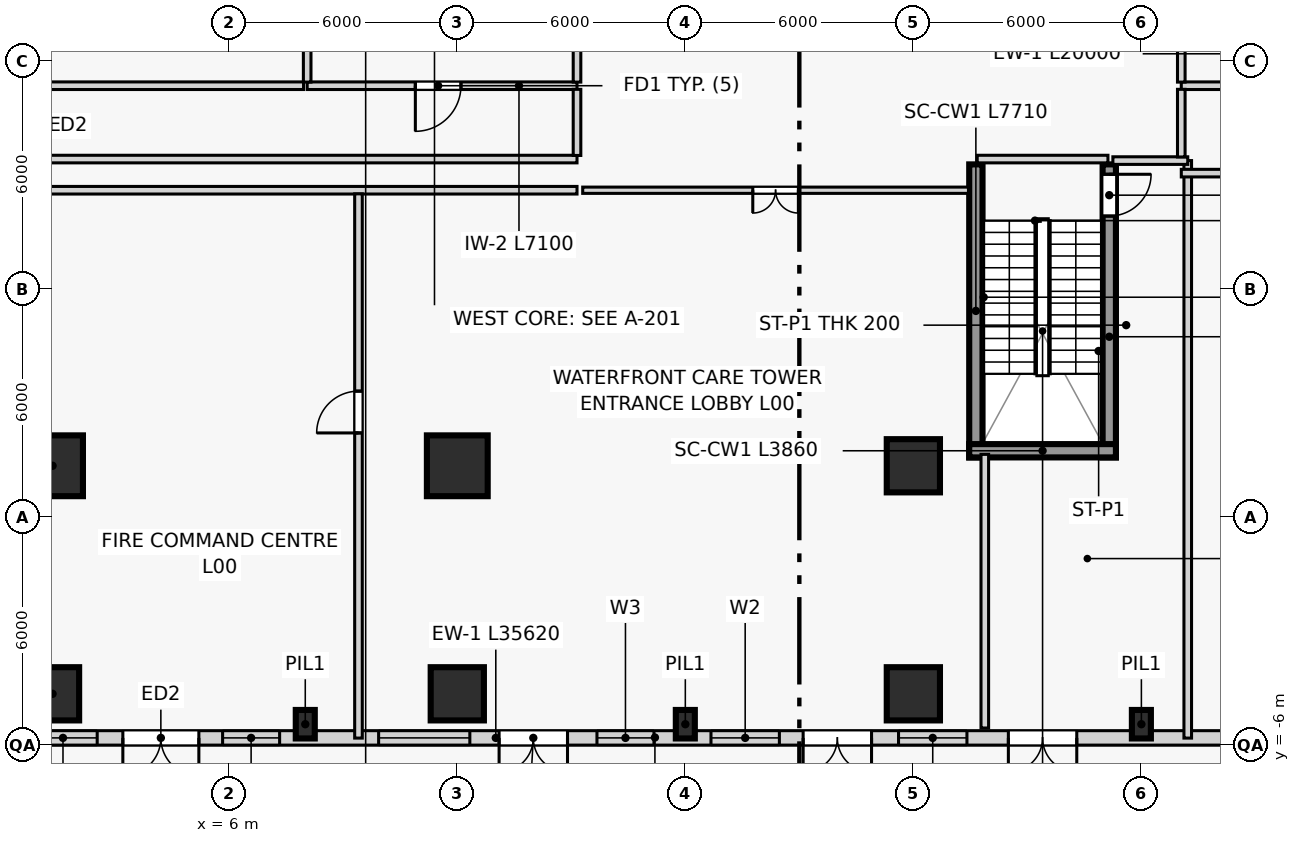
"""IFC4 building model, lengths in metres.
Left out: names, types, materials, properties, quantities, classifications, styles, units other than length and angle.
Written with IfcOpenShell. Run it as: python <this file> out.ifc"""

import sys

from ifc_helpers import new_model, si_unit, direction, frame, frame_2d, origin, origin_2d, place, context, subcontext, project, spatial, rectangle, extrude, source, transform, mapped, element, fill, save


model = new_model("IFC4")
c1 = context("Model", 3, precision=1e-05, world=origin(), true_north=direction((0.0, 1.0)))
c2 = subcontext(c1, "Body", "Model", "MODEL_VIEW")
j1 = project(units=[si_unit("LENGTHUNIT", "METRE"), si_unit("PLANEANGLEUNIT", "RADIAN")], contexts=[c1])
p1 = place(None, origin())
s1 = spatial("IfcSite", under=j1, at=p1, CompositionType="ELEMENT")
p2 = place(p1, origin())
s2 = spatial("IfcBuilding", under=s1, at=p2, CompositionType="ELEMENT")
p3 = place(p2, origin())
s3 = spatial("IfcBuildingStorey", under=s2, at=p3, CompositionType="ELEMENT", Elevation=0.0)
p4 = place(p3, frame((25.645, 1.57, 0.0), z_axis=(0.0, 0.0, 1.0), x_axis=(0.0, 1.0, 0.0)))
e1 = element("IfcWall", 1, at=p4, inside=s3, PredefinedType="SHEAR", context=c2, shape_type="SweptSolid", body=[
    extrude(rectangle(XDim=7.71, YDim=0.35, at=frame_2d((3.855, 0.0))), origin(), (0.0, 0.0, 1.0), 4.5),
])
p5 = place(p3, frame((29.155, 1.57, 0.0), z_axis=(0.0, 0.0, 1.0), x_axis=(0.0, 1.0, 0.0)))
e2 = element("IfcWall", 2, at=p5, inside=s3, PredefinedType="SHEAR", context=c2, shape_type="SweptSolid", body=[
    extrude(rectangle(XDim=7.71, YDim=0.35, at=frame_2d((3.855, 0.0))), origin(), (0.0, 0.0, 1.0), 4.5),
])
p6 = place(p5, frame((6.35, 0.0, 0.0)))
e3 = element("IfcOpeningElement", 3, at=p6, cuts=e2, PredefinedType="OPENING", context=c2, shape_type="SweptSolid", body=[
    extrude(rectangle(XDim=1.1, YDim=2.2, at=frame_2d((0.55, 1.1))), frame((0.0, 0.185, 0.0), z_axis=(0.0, -1.0, 0.0), x_axis=(1.0, 0.0, 0.0)), (0.0, 0.0, 1.0), 0.37),
])
p7 = place(p3, frame((25.47, 1.745, 0.0), z_axis=(0.0, 0.0, 1.0), x_axis=(1.0, 0.0, 0.0)))
e4 = element("IfcWall", 4, at=p7, inside=s3, PredefinedType="SHEAR", context=c2, shape_type="SweptSolid", body=[
    extrude(rectangle(XDim=3.86, YDim=0.35, at=frame_2d((1.93, 0.0))), origin(), (0.0, 0.0, 1.0), 4.5),
])
m1 = source(origin(), c2, "Body", "SweptSolid", [
    extrude(rectangle(XDim=1.4, YDim=1.4, at=origin_2d()), origin(), (0.0, 0.0, 1.0), 4.5),
])
p8 = place(p3, frame((1.35, -4.65, 0.0), z_axis=(0.0, 0.0, 1.0), x_axis=(1.0, 0.0, 0.0)))
e5 = element("IfcColumn", 5, at=p8, inside=s3, PredefinedType="COLUMN", context=c2, shape_type="MappedRepresentation", body=[
    mapped(m1, transform((0.0, 0.0, 0.0), scale=1.0)),
])
m2 = source(origin(), c2, "Body", "SweptSolid", [
    extrude(rectangle(XDim=1.6, YDim=1.6, at=origin_2d()), origin(), (0.0, 0.0, 1.0), 4.5),
])
p9 = place(p3, frame((1.35, 1.35, 0.0), z_axis=(0.0, 0.0, 1.0), x_axis=(1.0, 0.0, 0.0)))
e6 = element("IfcColumn", 6, at=p9, inside=s3, PredefinedType="COLUMN", context=c2, shape_type="MappedRepresentation", body=[
    mapped(m2, transform((0.0, 0.0, 0.0), scale=1.0)),
])
p10 = place(p3, frame((12.0, -4.65, 0.0), z_axis=(0.0, 0.0, 1.0), x_axis=(1.0, 0.0, 0.0)))
e7 = element("IfcColumn", 7, at=p10, inside=s3, PredefinedType="COLUMN", context=c2, shape_type="MappedRepresentation", body=[
    mapped(m1, transform((0.0, 0.0, 0.0), scale=1.0)),
])
p11 = place(p3, frame((12.0, 1.35, 0.0), z_axis=(0.0, 0.0, 1.0), x_axis=(1.0, 0.0, 0.0)))
e8 = element("IfcColumn", 8, at=p11, inside=s3, PredefinedType="COLUMN", context=c2, shape_type="MappedRepresentation", body=[
    mapped(m2, transform((0.0, 0.0, 0.0), scale=1.0)),
])
for number, where, z_axis, x_axis in (
    (9, (24.0, -4.65, 0.0), (0.0, 0.0, 1.0), (1.0, 0.0, 0.0)),
    (10, (24.0, 1.35, 0.0), (0.0, 0.0, 1.0), (1.0, 0.0, 0.0)),
):
    element("IfcColumn", number, at=place(p3, frame(where, z_axis=z_axis, x_axis=x_axis)), inside=s3, PredefinedType="COLUMN", context=c2, shape_type="MappedRepresentation", body=[
        mapped(m1, transform((0.0, 0.0, 0.0), scale=1.0)),
    ])
m3 = source(origin(), c2, "Body", "SweptSolid", [
    extrude(rectangle(XDim=0.5, YDim=0.75, at=origin_2d()), origin(), (0.0, 0.0, 1.0), 4.5),
])
for number, where, z_axis, x_axis in (
    (11, (8.0, -5.45, 0.0), (0.0, 0.0, 1.0), (1.0, 0.0, 0.0)),
    (12, (18.0, -5.45, 0.0), (0.0, 0.0, 1.0), (1.0, 0.0, 0.0)),
    (13, (30.0, -5.45, 0.0), (0.0, 0.0, 1.0), (1.0, 0.0, 0.0)),
):
    element("IfcColumn", number, at=place(p3, frame(where, z_axis=z_axis, x_axis=x_axis)), inside=s3, PredefinedType="PILASTER", context=c2, shape_type="MappedRepresentation", body=[
        mapped(m3, transform((0.0, 0.0, 0.0), scale=1.0)),
    ])
p12 = place(p3, frame((0.19, -5.81, 0.0), z_axis=(0.0, 0.0, 1.0), x_axis=(1.0, 0.0, 0.0)))
e14 = element("IfcWall", 14, at=p12, inside=s3, PredefinedType="SOLIDWALL", context=c2, shape_type="SweptSolid", body=[
    extrude(rectangle(XDim=35.62, YDim=0.38, at=frame_2d((17.81, 0.0))), origin(), (0.0, 0.0, 1.0), 4.16),
])
p13 = place(p12, frame((0.535, 0.0, 0.8)))
e15 = element("IfcOpeningElement", 15, at=p13, cuts=e14, PredefinedType="OPENING", context=c2, shape_type="SweptSolid", body=[
    extrude(rectangle(XDim=1.8, YDim=2.1, at=frame_2d((0.9, 1.05))), frame((0.0, 0.2, 0.0), z_axis=(0.0, -1.0, 0.0), x_axis=(1.0, 0.0, 0.0)), (0.0, 0.0, 1.0), 0.4),
])
p14 = place(p12, frame((5.635, 0.0, 0.85)))
e16 = element("IfcOpeningElement", 16, at=p14, cuts=e14, PredefinedType="OPENING", context=c2, shape_type="SweptSolid", body=[
    extrude(rectangle(XDim=1.5, YDim=1.8, at=frame_2d((0.75, 0.9))), frame((0.0, 0.2, 0.0), z_axis=(0.0, -1.0, 0.0), x_axis=(1.0, 0.0, 0.0)), (0.0, 0.0, 1.0), 0.4),
])
p15 = place(p12, frame((9.74, 0.0, 0.8)))
e17 = element("IfcOpeningElement", 17, at=p15, cuts=e14, PredefinedType="OPENING", context=c2, shape_type="SweptSolid", body=[
    extrude(rectangle(XDim=2.4, YDim=2.1, at=frame_2d((1.2, 1.05))), frame((0.0, 0.2, 0.0), z_axis=(0.0, -1.0, 0.0), x_axis=(1.0, 0.0, 0.0)), (0.0, 0.0, 1.0), 0.4),
])
p16 = place(p12, frame((15.485, 0.0, 0.85)))
e18 = element("IfcOpeningElement", 18, at=p16, cuts=e14, PredefinedType="OPENING", context=c2, shape_type="SweptSolid", body=[
    extrude(rectangle(XDim=1.5, YDim=1.8, at=frame_2d((0.75, 0.9))), frame((0.0, 0.2, 0.0), z_axis=(0.0, -1.0, 0.0), x_axis=(1.0, 0.0, 0.0)), (0.0, 0.0, 1.0), 0.4),
])
p17 = place(p12, frame((18.485, 0.0, 0.8)))
e19 = element("IfcOpeningElement", 19, at=p17, cuts=e14, PredefinedType="OPENING", context=c2, shape_type="SweptSolid", body=[
    extrude(rectangle(XDim=1.8, YDim=2.1, at=frame_2d((0.9, 1.05))), frame((0.0, 0.2, 0.0), z_axis=(0.0, -1.0, 0.0), x_axis=(1.0, 0.0, 0.0)), (0.0, 0.0, 1.0), 0.4),
])
p18 = place(p12, frame((23.42, 0.0, 0.8)))
e20 = element("IfcOpeningElement", 20, at=p18, cuts=e14, PredefinedType="OPENING", context=c2, shape_type="SweptSolid", body=[
    extrude(rectangle(XDim=1.8, YDim=2.1, at=frame_2d((0.9, 1.05))), frame((0.0, 0.2, 0.0), z_axis=(0.0, -1.0, 0.0), x_axis=(1.0, 0.0, 0.0)), (0.0, 0.0, 1.0), 0.4),
])
p19 = place(p12, frame((3.01, 0.0, 0.0)))
e21 = element("IfcOpeningElement", 21, at=p19, cuts=e14, PredefinedType="OPENING", context=c2, shape_type="SweptSolid", body=[
    extrude(rectangle(XDim=2.0, YDim=2.4, at=frame_2d((1.0, 1.2))), frame((0.0, 0.2, 0.0), z_axis=(0.0, -1.0, 0.0), x_axis=(1.0, 0.0, 0.0)), (0.0, 0.0, 1.0), 0.4),
])
p20 = place(p12, frame((12.91, 0.0, 0.0)))
e22 = element("IfcOpeningElement", 22, at=p20, cuts=e14, PredefinedType="OPENING", context=c2, shape_type="SweptSolid", body=[
    extrude(rectangle(XDim=1.8, YDim=2.4, at=frame_2d((0.9, 1.2))), frame((0.0, 0.2, 0.0), z_axis=(0.0, -1.0, 0.0), x_axis=(1.0, 0.0, 0.0)), (0.0, 0.0, 1.0), 0.4),
])
p21 = place(p12, frame((20.91, 0.0, 0.0)))
e23 = element("IfcOpeningElement", 23, at=p21, cuts=e14, PredefinedType="OPENING", context=c2, shape_type="SweptSolid", body=[
    extrude(rectangle(XDim=1.8, YDim=2.4, at=frame_2d((0.9, 1.2))), frame((0.0, 0.2, 0.0), z_axis=(0.0, -1.0, 0.0), x_axis=(1.0, 0.0, 0.0)), (0.0, 0.0, 1.0), 0.4),
])
p22 = place(p12, frame((26.31, 0.0, 0.0)))
e24 = element("IfcOpeningElement", 24, at=p22, cuts=e14, PredefinedType="OPENING", context=c2, shape_type="SweptSolid", body=[
    extrude(rectangle(XDim=1.8, YDim=2.4, at=frame_2d((0.9, 1.2))), frame((0.0, 0.2, 0.0), z_axis=(0.0, -1.0, 0.0), x_axis=(1.0, 0.0, 0.0)), (0.0, 0.0, 1.0), 0.4),
])
p23 = place(p12, frame((32.01, 0.0, 0.0)))
e25 = element("IfcOpeningElement", 25, at=p23, cuts=e14, PredefinedType="OPENING", context=c2, shape_type="SweptSolid", body=[
    extrude(rectangle(XDim=2.0, YDim=2.4, at=frame_2d((1.0, 1.2))), frame((0.0, 0.2, 0.0), z_axis=(0.0, -1.0, 0.0), x_axis=(1.0, 0.0, 0.0)), (0.0, 0.0, 1.0), 0.4),
])
p24 = place(p3, frame((8.05, 11.35, 0.0), z_axis=(0.0, 0.0, 1.0), x_axis=(1.0, 0.0, 0.0)))
e26 = element("IfcWall", 26, at=p24, inside=s3, PredefinedType="PARTITIONING", context=c2, shape_type="SweptSolid", body=[
    extrude(rectangle(XDim=7.1, YDim=0.2, at=frame_2d((3.55, 0.0))), origin(), (0.0, 0.0, 1.0), 4.16),
])
p25 = place(p24, frame((2.846, 0.0, 0.0)))
e27 = element("IfcOpeningElement", 27, at=p25, cuts=e26, PredefinedType="OPENING", context=c2, shape_type="SweptSolid", body=[
    extrude(rectangle(XDim=1.2, YDim=2.2, at=frame_2d((0.6, 1.1))), frame((0.0, 0.11, 0.0), z_axis=(0.0, -1.0, 0.0), x_axis=(1.0, 0.0, 0.0)), (0.0, 0.0, 1.0), 0.22),
])
for number, where, z_axis, x_axis in (
    (28, (8.05, 11.445, 0.0), (0.0, 0.0, 1.0), (0.0, 1.0, 0.0)),
    (29, (15.15, 11.445, 0.0), (0.0, 0.0, 1.0), (0.0, 1.0, 0.0)),
):
    element("IfcWall", number, at=place(p3, frame(where, z_axis=z_axis, x_axis=x_axis)), inside=s3, PredefinedType="PARTITIONING", context=c2, shape_type="SweptSolid", body=[
        extrude(rectangle(XDim=2.985, YDim=0.2, at=frame_2d((1.492, 0.0))), origin(), (0.0, 0.0, 1.0), 4.16),
    ])
p26 = place(p3, frame((31.05, 11.35, 0.0), z_axis=(0.0, 0.0, 1.0), x_axis=(1.0, 0.0, 0.0)))
e30 = element("IfcWall", 30, at=p26, inside=s3, PredefinedType="PARTITIONING", context=c2, shape_type="SweptSolid", body=[
    extrude(rectangle(XDim=6.2, YDim=0.2, at=frame_2d((3.1, 0.0))), origin(), (0.0, 0.0, 1.0), 4.16),
])
p27 = place(p26, frame((2.586, 0.0, 0.0)))
e31 = element("IfcOpeningElement", 31, at=p27, cuts=e30, PredefinedType="OPENING", context=c2, shape_type="SweptSolid", body=[
    extrude(rectangle(XDim=1.2, YDim=2.2, at=frame_2d((0.6, 1.1))), frame((0.0, 0.11, 0.0), z_axis=(0.0, -1.0, 0.0), x_axis=(1.0, 0.0, 0.0)), (0.0, 0.0, 1.0), 0.22),
])
p28 = place(p3, frame((31.05, 11.445, 0.0), z_axis=(0.0, 0.0, 1.0), x_axis=(0.0, 1.0, 0.0)))
e32 = element("IfcWall", 32, at=p28, inside=s3, PredefinedType="PARTITIONING", context=c2, shape_type="SweptSolid", body=[
    extrude(rectangle(XDim=2.985, YDim=0.2, at=frame_2d((1.492, 0.0))), origin(), (0.0, 0.0, 1.0), 4.16),
])
p29 = place(p3, frame((25.68, 9.42, 0.0), z_axis=(0.0, 0.0, 1.0), x_axis=(1.0, 0.0, 0.0)))
e33 = element("IfcWall", 33, at=p29, inside=s3, PredefinedType="PARTITIONING", context=c2, shape_type="SweptSolid", body=[
    extrude(rectangle(XDim=3.44, YDim=0.2, at=frame_2d((1.72, 0.0))), origin(), (0.0, 0.0, 1.0), 4.16),
])
p30 = place(p3, frame((15.3, 8.6, 0.0), z_axis=(0.0, 0.0, 1.0), x_axis=(1.0, 0.0, 0.0)))
e34 = element("IfcWall", 34, at=p30, inside=s3, PredefinedType="PARTITIONING", context=c2, shape_type="SweptSolid", body=[
    extrude(rectangle(XDim=10.15, YDim=0.165, at=frame_2d((5.075, 0.0))), origin(), (0.0, 0.0, 1.0), 4.16),
])
p31 = place(p30, frame((4.475, 0.0, 0.0)))
e35 = element("IfcOpeningElement", 35, at=p31, cuts=e34, PredefinedType="OPENING", context=c2, shape_type="SweptSolid", body=[
    extrude(rectangle(XDim=1.2, YDim=2.2, at=frame_2d((0.6, 1.1))), frame((0.0, 0.093, 0.0), z_axis=(0.0, -1.0, 0.0), x_axis=(1.0, 0.0, 0.0)), (0.0, 0.0, 1.0), 0.185),
])
p32 = place(p3, frame((0.39, 9.42, 0.0), z_axis=(0.0, 0.0, 1.0), x_axis=(1.0, 0.0, 0.0)))
e36 = element("IfcWall", 36, at=p32, inside=s3, PredefinedType="PARTITIONING", context=c2, shape_type="SweptSolid", body=[
    extrude(rectangle(XDim=14.76, YDim=0.2, at=frame_2d((7.38, 0.0))), origin(), (0.0, 0.0, 1.0), 4.16),
])
p33 = place(p3, frame((0.39, 11.35, 0.0), z_axis=(0.0, 0.0, 1.0), x_axis=(1.0, 0.0, 0.0)))
e37 = element("IfcWall", 37, at=p33, inside=s3, PredefinedType="PARTITIONING", context=c2, shape_type="SweptSolid", body=[
    extrude(rectangle(XDim=7.565, YDim=0.2, at=frame_2d((3.783, 0.0))), origin(), (0.0, 0.0, 1.0), 4.16),
])
p34 = place(p3, frame((15.15, 9.515, 0.0), z_axis=(0.0, 0.0, 1.0), x_axis=(0.0, 1.0, 0.0)))
e38 = element("IfcWall", 38, at=p34, inside=s3, PredefinedType="PARTITIONING", context=c2, shape_type="SweptSolid", body=[
    extrude(rectangle(XDim=1.74, YDim=0.2, at=frame_2d((0.87, 0.0))), origin(), (0.0, 0.0, 1.0), 4.16),
])
p35 = place(p3, frame((0.185, 8.6, 0.0), z_axis=(0.0, 0.0, 1.0), x_axis=(1.0, 0.0, 0.0)))
e39 = element("IfcWall", 39, at=p35, inside=s3, PredefinedType="PARTITIONING", context=c2, shape_type="SweptSolid", body=[
    extrude(rectangle(XDim=14.965, YDim=0.2, at=frame_2d((7.482, 0.0))), origin(), (0.0, 0.0, 1.0), 4.16),
])
p36 = place(p3, frame((9.4, -5.815, 0.0), z_axis=(0.0, 0.0, 1.0), x_axis=(0.0, 1.0, 0.0)))
e40 = element("IfcWall", 40, at=p36, inside=s3, PredefinedType="PARTITIONING", context=c2, shape_type="SweptSolid", body=[
    extrude(rectangle(XDim=14.32, YDim=0.2, at=frame_2d((7.16, 0.0))), origin(), (0.0, 0.0, 1.0), 4.16),
])
p37 = place(p36, frame((8.029, 0.0, 0.0)))
e41 = element("IfcOpeningElement", 41, at=p37, cuts=e40, PredefinedType="OPENING", context=c2, shape_type="SweptSolid", body=[
    extrude(rectangle(XDim=1.1, YDim=2.2, at=frame_2d((0.55, 1.1))), frame((0.0, 0.11, 0.0), z_axis=(0.0, -1.0, 0.0), x_axis=(1.0, 0.0, 0.0)), (0.0, 0.0, 1.0), 0.22),
])
p38 = place(p3, frame((25.88, -5.55, 0.0), z_axis=(0.0, 0.0, 1.0), x_axis=(0.0, 1.0, 0.0)))
e42 = element("IfcWall", 42, at=p38, inside=s3, PredefinedType="PARTITIONING", context=c2, shape_type="SweptSolid", body=[
    extrude(rectangle(XDim=7.2, YDim=0.2, at=frame_2d((3.6, 0.0))), origin(), (0.0, 0.0, 1.0), 4.16),
])
p39 = place(p3, frame((31.22, -5.815, 0.0), z_axis=(0.0, 0.0, 1.0), x_axis=(0.0, 1.0, 0.0)))
e43 = element("IfcWall", 43, at=p39, inside=s3, PredefinedType="PARTITIONING", context=c2, shape_type="SweptSolid", body=[
    extrude(rectangle(XDim=15.195, YDim=0.2, at=frame_2d((7.597, 0.0))), origin(), (0.0, 0.0, 1.0), 4.16),
])
p40 = place(p3, frame((29.25, 9.38, 0.0), z_axis=(0.0, 0.0, 1.0), x_axis=(1.0, 0.0, 0.0)))
e44 = element("IfcWall", 44, at=p40, inside=s3, PredefinedType="PARTITIONING", context=c2, shape_type="SweptSolid", body=[
    extrude(rectangle(XDim=1.97, YDim=0.2, at=frame_2d((0.985, 0.0))), origin(), (0.0, 0.0, 1.0), 4.16),
])
p41 = place(p3, frame((31.05, 9.475, 0.0), z_axis=(0.0, 0.0, 1.0), x_axis=(0.0, 1.0, 0.0)))
e45 = element("IfcWall", 45, at=p41, inside=s3, PredefinedType="PARTITIONING", context=c2, shape_type="SweptSolid", body=[
    extrude(rectangle(XDim=1.78, YDim=0.2, at=frame_2d((0.89, 0.0))), origin(), (0.0, 0.0, 1.0), 4.16),
])
p42 = place(p3, frame((31.05, 9.05, 0.0), z_axis=(0.0, 0.0, 1.0), x_axis=(1.0, 0.0, 0.0)))
e46 = element("IfcWall", 46, at=p42, inside=s3, PredefinedType="PARTITIONING", context=c2, shape_type="SweptSolid", body=[
    extrude(rectangle(XDim=4.67, YDim=0.2, at=frame_2d((2.335, 0.0))), origin(), (0.0, 0.0, 1.0), 4.16),
])
m4 = source(origin(), c2, "Body", "SweptSolid", [
    extrude(rectangle(XDim=1.8, YDim=2.1, at=frame_2d((0.9, 1.05))), frame((0.0, 0.03, 0.0), z_axis=(0.0, -1.0, 0.0), x_axis=(1.0, 0.0, 0.0)), (0.0, 0.0, 1.0), 0.06),
])
p43 = place(p13, origin())
e47 = element("IfcWindow", 47, at=p43, inside=s3, PartitioningType="SINGLE_PANEL", PredefinedType="WINDOW", context=c2, shape_type="MappedRepresentation", body=[
    mapped(m4, transform((0.0, 0.0, 0.0), scale=1.0)),
])
fill(e15, e47)
m5 = source(origin(), c2, "Body", "SweptSolid", [
    extrude(rectangle(XDim=1.5, YDim=1.8, at=frame_2d((0.75, 0.9))), frame((0.0, 0.03, 0.0), z_axis=(0.0, -1.0, 0.0), x_axis=(1.0, 0.0, 0.0)), (0.0, 0.0, 1.0), 0.06),
])
p44 = place(p14, origin())
e48 = element("IfcWindow", 48, at=p44, inside=s3, PartitioningType="SINGLE_PANEL", PredefinedType="WINDOW", context=c2, shape_type="MappedRepresentation", body=[
    mapped(m5, transform((0.0, 0.0, 0.0), scale=1.0)),
])
fill(e16, e48)
m6 = source(origin(), c2, "Body", "SweptSolid", [
    extrude(rectangle(XDim=2.4, YDim=2.1, at=frame_2d((1.2, 1.05))), frame((0.0, 0.03, 0.0), z_axis=(0.0, -1.0, 0.0), x_axis=(1.0, 0.0, 0.0)), (0.0, 0.0, 1.0), 0.06),
])
p45 = place(p15, origin())
e49 = element("IfcWindow", 49, at=p45, inside=s3, PartitioningType="SINGLE_PANEL", PredefinedType="WINDOW", context=c2, shape_type="MappedRepresentation", body=[
    mapped(m6, transform((0.0, 0.0, 0.0), scale=1.0)),
])
fill(e17, e49)
p46 = place(p16, origin())
e50 = element("IfcWindow", 50, at=p46, inside=s3, PartitioningType="SINGLE_PANEL", PredefinedType="WINDOW", context=c2, shape_type="MappedRepresentation", body=[
    mapped(m5, transform((0.0, 0.0, 0.0), scale=1.0)),
])
fill(e18, e50)
p47 = place(p17, origin())
e51 = element("IfcWindow", 51, at=p47, inside=s3, PartitioningType="SINGLE_PANEL", PredefinedType="WINDOW", context=c2, shape_type="MappedRepresentation", body=[
    mapped(m4, transform((0.0, 0.0, 0.0), scale=1.0)),
])
fill(e19, e51)
p48 = place(p18, origin())
e52 = element("IfcWindow", 52, at=p48, inside=s3, PartitioningType="SINGLE_PANEL", PredefinedType="WINDOW", context=c2, shape_type="MappedRepresentation", body=[
    mapped(m4, transform((0.0, 0.0, 0.0), scale=1.0)),
])
fill(e20, e52)
m7 = source(origin(), c2, "Body", "SweptSolid", [
    extrude(rectangle(XDim=2.0, YDim=2.4, at=frame_2d((1.0, 1.2))), frame((0.0, 0.025, 0.0), z_axis=(0.0, -1.0, 0.0), x_axis=(1.0, 0.0, 0.0)), (0.0, 0.0, 1.0), 0.05),
])
p49 = place(p19, frame((2.0, 0.0, 0.0), z_axis=(0.0, 0.0, 1.0), x_axis=(-1.0, 0.0, 0.0)))
e53 = element("IfcDoor", 53, at=p49, inside=s3, OperationType="DOUBLE_DOOR_SINGLE_SWING", PredefinedType="DOOR", context=c2, shape_type="MappedRepresentation", body=[
    mapped(m7, transform((0.0, 0.0, 0.0), scale=1.0)),
])
fill(e21, e53)
m8 = source(origin(), c2, "Body", "SweptSolid", [
    extrude(rectangle(XDim=1.8, YDim=2.4, at=frame_2d((0.9, 1.2))), frame((0.0, 0.025, 0.0), z_axis=(0.0, -1.0, 0.0), x_axis=(1.0, 0.0, 0.0)), (0.0, 0.0, 1.0), 0.05),
])
p50 = place(p20, frame((1.8, 0.0, 0.0), z_axis=(0.0, 0.0, 1.0), x_axis=(-1.0, 0.0, 0.0)))
e54 = element("IfcDoor", 54, at=p50, inside=s3, OperationType="DOUBLE_DOOR_SINGLE_SWING", PredefinedType="DOOR", context=c2, shape_type="MappedRepresentation", body=[
    mapped(m8, transform((0.0, 0.0, 0.0), scale=1.0)),
])
fill(e22, e54)
p51 = place(p21, frame((1.8, 0.0, 0.0), z_axis=(0.0, 0.0, 1.0), x_axis=(-1.0, 0.0, 0.0)))
e55 = element("IfcDoor", 55, at=p51, inside=s3, OperationType="DOUBLE_DOOR_SINGLE_SWING", PredefinedType="DOOR", context=c2, shape_type="MappedRepresentation", body=[
    mapped(m8, transform((0.0, 0.0, 0.0), scale=1.0)),
])
fill(e23, e55)
p52 = place(p22, frame((1.8, 0.0, 0.0), z_axis=(0.0, 0.0, 1.0), x_axis=(-1.0, 0.0, 0.0)))
e56 = element("IfcDoor", 56, at=p52, inside=s3, OperationType="DOUBLE_DOOR_SINGLE_SWING", PredefinedType="DOOR", context=c2, shape_type="MappedRepresentation", body=[
    mapped(m8, transform((0.0, 0.0, 0.0), scale=1.0)),
])
fill(e24, e56)
m9 = source(origin(), c2, "Body", "SweptSolid", [
    extrude(rectangle(XDim=1.2, YDim=2.2, at=frame_2d((0.6, 1.1))), frame((0.0, 0.025, 0.0), z_axis=(0.0, -1.0, 0.0), x_axis=(1.0, 0.0, 0.0)), (0.0, 0.0, 1.0), 0.05),
])
p53 = place(p25, frame((1.2, 0.0, 0.0), z_axis=(0.0, 0.0, 1.0), x_axis=(-1.0, 0.0, 0.0)))
e57 = element("IfcDoor", 57, at=p53, inside=s3, OperationType="SINGLE_SWING_RIGHT", PredefinedType="DOOR", context=c2, shape_type="MappedRepresentation", body=[
    mapped(m9, transform((0.0, 0.0, 0.0), scale=1.0)),
])
fill(e27, e57)
m10 = source(origin(), c2, "Body", "SweptSolid", [
    extrude(rectangle(XDim=1.1, YDim=2.2, at=frame_2d((0.55, 1.1))), frame((0.0, 0.025, 0.0), z_axis=(0.0, -1.0, 0.0), x_axis=(1.0, 0.0, 0.0)), (0.0, 0.0, 1.0), 0.05),
])
p54 = place(p6, frame((1.1, 0.0, 0.0), z_axis=(0.0, 0.0, 1.0), x_axis=(-1.0, 0.0, 0.0)))
e58 = element("IfcDoor", 58, at=p54, inside=s3, OperationType="SINGLE_SWING_LEFT", PredefinedType="DOOR", context=c2, shape_type="MappedRepresentation", body=[
    mapped(m10, transform((0.0, 0.0, 0.0), scale=1.0)),
])
fill(e3, e58)
p55 = place(p37, origin())
e59 = element("IfcDoor", 59, at=p55, inside=s3, OperationType="SINGLE_SWING_LEFT", PredefinedType="DOOR", context=c2, shape_type="MappedRepresentation", body=[
    mapped(m10, transform((0.0, 0.0, 0.0), scale=1.0)),
])
fill(e41, e59)
p56 = place(p31, frame((1.2, 0.0, 0.0), z_axis=(0.0, 0.0, 1.0), x_axis=(-1.0, 0.0, 0.0)))
e60 = element("IfcDoor", 60, at=p56, inside=s3, OperationType="DOUBLE_DOOR_SINGLE_SWING", PredefinedType="DOOR", context=c2, shape_type="MappedRepresentation", body=[
    mapped(m9, transform((0.0, 0.0, 0.0), scale=1.0)),
])
fill(e35, e60)
save(model, sys.argv[1])
